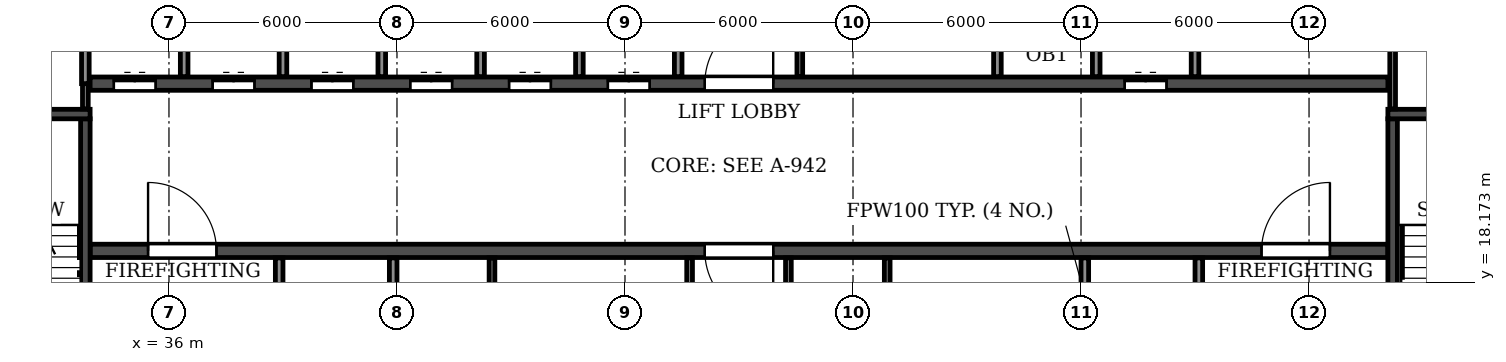
"""IFC4 building model, lengths in metres.
Left out: names, types, materials, properties, quantities, classifications, styles, units other than length and angle.
Written with IfcOpenShell. Run it as: python <this file> out.ifc"""

import sys

from ifc_helpers import new_model, si_unit, direction, frame, frame_2d, origin, place, context, subcontext, project, spatial, rectangle, extrude, element, fill, save


model = new_model("IFC4")
c1 = context("Model", 3, precision=1e-05, world=origin(), true_north=direction((0.0, 1.0)))
c2 = subcontext(c1, "Body", "Model", "MODEL_VIEW")
j1 = project(units=[si_unit("LENGTHUNIT", "METRE"), si_unit("PLANEANGLEUNIT", "RADIAN")], contexts=[c1])
p1 = place(None, origin())
s1 = spatial("IfcSite", under=j1, at=p1, CompositionType="ELEMENT")
p2 = place(p1, origin())
s2 = spatial("IfcBuilding", under=s1, at=p2, CompositionType="ELEMENT")
p3 = place(p2, frame((0.0, 0.0, 251.1)))
s3 = spatial("IfcBuildingStorey", under=s2, at=p3, CompositionType="ELEMENT", Elevation=251.1)
p4 = place(p3, frame((33.925, 19.0, 0.0), z_axis=(0.0, 0.0, 1.0), x_axis=(1.0, 0.0, 0.0)))
e1 = element("IfcWall", 1, at=p4, inside=s3, PredefinedType="SOLIDWALL", context=c2, shape_type="SweptSolid", body=[
    extrude(rectangle(XDim=34.15, YDim=0.35, at=frame_2d((17.075, 0.0))), origin(), (0.0, 0.0, 1.0), 3.08),
])
p5 = place(p4, frame((16.175, 0.0, 0.0)))
e2 = element("IfcOpeningElement", 2, at=p5, cuts=e1, PredefinedType="OPENING", context=c2, shape_type="SweptSolid", body=[
    extrude(rectangle(XDim=1.8, YDim=2.1, at=frame_2d((0.9, 1.05))), frame((0.0, 0.185, 0.0), z_axis=(0.0, -1.0, 0.0), x_axis=(1.0, 0.0, 0.0)), (0.0, 0.0, 1.0), 0.37),
])
p6 = place(p4, frame((1.525, 0.0, 0.0)))
e3 = element("IfcOpeningElement", 3, at=p6, cuts=e1, PredefinedType="OPENING", context=c2, shape_type="SweptSolid", body=[
    extrude(rectangle(XDim=1.8, YDim=2.1, at=frame_2d((0.9, 1.05))), frame((0.0, 0.185, 0.0), z_axis=(0.0, -1.0, 0.0), x_axis=(1.0, 0.0, 0.0)), (0.0, 0.0, 1.0), 0.37),
])
p7 = place(p4, frame((30.825, 0.0, 0.0)))
e4 = element("IfcOpeningElement", 4, at=p7, cuts=e1, PredefinedType="OPENING", context=c2, shape_type="SweptSolid", body=[
    extrude(rectangle(XDim=1.8, YDim=2.1, at=frame_2d((0.9, 1.05))), frame((0.0, 0.185, 0.0), z_axis=(0.0, -1.0, 0.0), x_axis=(1.0, 0.0, 0.0)), (0.0, 0.0, 1.0), 0.37),
])
p8 = place(p3, frame((33.925, 23.4, 0.0), z_axis=(0.0, 0.0, 1.0), x_axis=(1.0, 0.0, 0.0)))
e5 = element("IfcWall", 5, at=p8, inside=s3, PredefinedType="SOLIDWALL", context=c2, shape_type="SweptSolid", body=[
    extrude(rectangle(XDim=34.15, YDim=0.35, at=frame_2d((17.075, 0.0))), origin(), (0.0, 0.0, 1.0), 3.08),
])
p9 = place(p8, frame((16.175, 0.0, 0.0)))
e6 = element("IfcOpeningElement", 6, at=p9, cuts=e5, PredefinedType="OPENING", context=c2, shape_type="SweptSolid", body=[
    extrude(rectangle(XDim=1.8, YDim=2.1, at=frame_2d((0.9, 1.05))), frame((0.0, 0.185, 0.0), z_axis=(0.0, -1.0, 0.0), x_axis=(1.0, 0.0, 0.0)), (0.0, 0.0, 1.0), 0.37),
])
p10 = place(p8, frame((0.625, 0.0, 0.0)))
e7 = element("IfcOpeningElement", 7, at=p10, cuts=e5, PredefinedType="OPENING", context=c2, shape_type="SweptSolid", body=[
    extrude(rectangle(XDim=1.1, YDim=2.1, at=frame_2d((0.55, 1.05))), frame((0.0, 0.185, 0.0), z_axis=(0.0, -1.0, 0.0), x_axis=(1.0, 0.0, 0.0)), (0.0, 0.0, 1.0), 0.37),
])
p11 = place(p8, frame((3.225, 0.0, 0.0)))
e8 = element("IfcOpeningElement", 8, at=p11, cuts=e5, PredefinedType="OPENING", context=c2, shape_type="SweptSolid", body=[
    extrude(rectangle(XDim=1.1, YDim=2.1, at=frame_2d((0.55, 1.05))), frame((0.0, 0.185, 0.0), z_axis=(0.0, -1.0, 0.0), x_axis=(1.0, 0.0, 0.0)), (0.0, 0.0, 1.0), 0.37),
])
p12 = place(p8, frame((5.825, 0.0, 0.0)))
e9 = element("IfcOpeningElement", 9, at=p12, cuts=e5, PredefinedType="OPENING", context=c2, shape_type="SweptSolid", body=[
    extrude(rectangle(XDim=1.1, YDim=2.1, at=frame_2d((0.55, 1.05))), frame((0.0, 0.185, 0.0), z_axis=(0.0, -1.0, 0.0), x_axis=(1.0, 0.0, 0.0)), (0.0, 0.0, 1.0), 0.37),
])
p13 = place(p8, frame((8.425, 0.0, 0.0)))
e10 = element("IfcOpeningElement", 10, at=p13, cuts=e5, PredefinedType="OPENING", context=c2, shape_type="SweptSolid", body=[
    extrude(rectangle(XDim=1.1, YDim=2.1, at=frame_2d((0.55, 1.05))), frame((0.0, 0.185, 0.0), z_axis=(0.0, -1.0, 0.0), x_axis=(1.0, 0.0, 0.0)), (0.0, 0.0, 1.0), 0.37),
])
p14 = place(p8, frame((11.025, 0.0, 0.0)))
e11 = element("IfcOpeningElement", 11, at=p14, cuts=e5, PredefinedType="OPENING", context=c2, shape_type="SweptSolid", body=[
    extrude(rectangle(XDim=1.1, YDim=2.1, at=frame_2d((0.55, 1.05))), frame((0.0, 0.185, 0.0), z_axis=(0.0, -1.0, 0.0), x_axis=(1.0, 0.0, 0.0)), (0.0, 0.0, 1.0), 0.37),
])
p15 = place(p8, frame((13.625, 0.0, 0.0)))
e12 = element("IfcOpeningElement", 12, at=p15, cuts=e5, PredefinedType="OPENING", context=c2, shape_type="SweptSolid", body=[
    extrude(rectangle(XDim=1.1, YDim=2.1, at=frame_2d((0.55, 1.05))), frame((0.0, 0.185, 0.0), z_axis=(0.0, -1.0, 0.0), x_axis=(1.0, 0.0, 0.0)), (0.0, 0.0, 1.0), 0.37),
])
p16 = place(p8, frame((27.225, 0.0, 0.0)))
e13 = element("IfcOpeningElement", 13, at=p16, cuts=e5, PredefinedType="OPENING", context=c2, shape_type="SweptSolid", body=[
    extrude(rectangle(XDim=1.1, YDim=2.1, at=frame_2d((0.55, 1.05))), frame((0.0, 0.185, 0.0), z_axis=(0.0, -1.0, 0.0), x_axis=(1.0, 0.0, 0.0)), (0.0, 0.0, 1.0), 0.37),
])
p17 = place(p3, frame((33.8, 14.775, 0.0), z_axis=(0.0, 0.0, 1.0), x_axis=(0.0, 1.0, 0.0)))
e14 = element("IfcWall", 14, at=p17, inside=s3, PredefinedType="SOLIDWALL", context=c2, shape_type="SweptSolid", body=[
    extrude(rectangle(XDim=7.7, YDim=0.25, at=frame_2d((3.85, 0.0))), origin(), (0.0, 0.0, 1.0), 3.08),
])
p18 = place(p17, frame((0.525, 0.0, 0.0)))
e15 = element("IfcOpeningElement", 15, at=p18, cuts=e14, PredefinedType="OPENING", context=c2, shape_type="SweptSolid", body=[
    extrude(rectangle(XDim=1.0, YDim=2.1, at=frame_2d((0.5, 1.05))), frame((0.0, 0.135, 0.0), z_axis=(0.0, -1.0, 0.0), x_axis=(1.0, 0.0, 0.0)), (0.0, 0.0, 1.0), 0.27),
])
p19 = place(p3, frame((29.875, 22.6, 0.0), z_axis=(0.0, 0.0, 1.0), x_axis=(1.0, 0.0, 0.0)))
e16 = element("IfcWall", 16, at=p19, inside=s3, PredefinedType="SOLIDWALL", context=c2, shape_type="SweptSolid", body=[
    extrude(rectangle(XDim=4.05, YDim=0.25, at=frame_2d((2.025, 0.0))), origin(), (0.0, 0.0, 1.0), 3.08),
])
p20 = place(p3, frame((68.2, 14.775, 0.0), z_axis=(0.0, 0.0, 1.0), x_axis=(0.0, 1.0, 0.0)))
e17 = element("IfcWall", 17, at=p20, inside=s3, PredefinedType="SOLIDWALL", context=c2, shape_type="SweptSolid", body=[
    extrude(rectangle(XDim=7.7, YDim=0.25, at=frame_2d((3.85, 0.0))), origin(), (0.0, 0.0, 1.0), 3.08),
])
p21 = place(p20, frame((0.525, 0.0, 0.0)))
e18 = element("IfcOpeningElement", 18, at=p21, cuts=e17, PredefinedType="OPENING", context=c2, shape_type="SweptSolid", body=[
    extrude(rectangle(XDim=1.0, YDim=2.1, at=frame_2d((0.5, 1.05))), frame((0.0, 0.135, 0.0), z_axis=(0.0, -1.0, 0.0), x_axis=(1.0, 0.0, 0.0)), (0.0, 0.0, 1.0), 0.27),
])
p22 = place(p3, frame((68.075, 22.6, 0.0), z_axis=(0.0, 0.0, 1.0), x_axis=(1.0, 0.0, 0.0)))
e19 = element("IfcWall", 19, at=p22, inside=s3, PredefinedType="SOLIDWALL", context=c2, shape_type="SweptSolid", body=[
    extrude(rectangle(XDim=4.05, YDim=0.25, at=frame_2d((2.025, 0.0))), origin(), (0.0, 0.0, 1.0), 3.08),
])
for number, where, z_axis, x_axis in (
    (20, (49.7, 14.785, 0.0), (0.0, 0.0, 1.0), (0.0, 1.0, 0.0)),
    (21, (52.3, 14.785, 0.0), (0.0, 0.0, 1.0), (0.0, 1.0, 0.0)),
    (22, (52.6, 23.585, 0.0), (0.0, 0.0, 1.0), (0.0, 1.0, 0.0)),
    (23, (44.5, 14.785, 0.0), (0.0, 0.0, 1.0), (0.0, 1.0, 0.0)),
    (24, (54.9, 14.785, 0.0), (0.0, 0.0, 1.0), (0.0, 1.0, 0.0)),
):
    element("IfcWall", number, at=place(p3, frame(where, z_axis=z_axis, x_axis=x_axis)), inside=s3, PredefinedType="PARTITIONING", context=c2, shape_type="SweptSolid", body=[
        extrude(rectangle(XDim=4.03, YDim=0.15, at=frame_2d((2.015, 0.0))), origin(), (0.0, 0.0, 1.0), 3.08),
    ])
p23 = place(p3, frame((33.8, 22.735, 0.0), z_axis=(0.0, 0.0, 1.0), x_axis=(0.0, 1.0, 0.0)))
e25 = element("IfcWall", 25, at=p23, inside=s3, PredefinedType="PARTITIONING", context=c2, shape_type="SweptSolid", body=[
    extrude(rectangle(XDim=0.665, YDim=0.15, at=frame_2d((0.333, 0.0))), origin(), (0.0, 0.0, 1.0), 3.08),
])
p24 = place(p3, frame((68.2, 22.735, 0.0), z_axis=(0.0, 0.0, 1.0), x_axis=(0.0, 1.0, 0.0)))
e26 = element("IfcWall", 26, at=p24, inside=s3, PredefinedType="PARTITIONING", context=c2, shape_type="SweptSolid", body=[
    extrude(rectangle(XDim=4.88, YDim=0.15, at=frame_2d((2.44, 0.0))), origin(), (0.0, 0.0, 1.0), 3.08),
])
p25 = place(p3, frame((33.8, 23.4, 0.0), z_axis=(0.0, 0.0, 1.0), x_axis=(0.0, 1.0, 0.0)))
e27 = element("IfcWall", 27, at=p25, inside=s3, PredefinedType="PARTITIONING", context=c2, shape_type="SweptSolid", body=[
    extrude(rectangle(XDim=2.7, YDim=0.2, at=frame_2d((1.35, 0.0))), origin(), (0.0, 0.0, 1.0), 3.08),
])
p26 = place(p3, frame((36.4, 23.585, 0.0), z_axis=(0.0, 0.0, 1.0), x_axis=(0.0, 1.0, 0.0)))
e28 = element("IfcWall", 28, at=p26, inside=s3, PredefinedType="PARTITIONING", context=c2, shape_type="SweptSolid", body=[
    extrude(rectangle(XDim=2.515, YDim=0.2, at=frame_2d((1.258, 0.0))), origin(), (0.0, 0.0, 1.0), 3.08),
])
p27 = place(p3, frame((38.9, 14.785, 0.0), z_axis=(0.0, 0.0, 1.0), x_axis=(0.0, 1.0, 0.0)))
e29 = element("IfcWall", 29, at=p27, inside=s3, PredefinedType="PARTITIONING", context=c2, shape_type="SweptSolid", body=[
    extrude(rectangle(XDim=4.03, YDim=0.2, at=frame_2d((2.015, 0.0))), origin(), (0.0, 0.0, 1.0), 3.08),
])
p28 = place(p27, frame((1.465, 0.0, 0.0)))
e30 = element("IfcOpeningElement", 30, at=p28, cuts=e29, PredefinedType="OPENING", context=c2, shape_type="SweptSolid", body=[
    extrude(rectangle(XDim=1.1, YDim=2.1, at=frame_2d((0.55, 1.05))), frame((0.0, 0.11, 0.0), z_axis=(0.0, -1.0, 0.0), x_axis=(1.0, 0.0, 0.0)), (0.0, 0.0, 1.0), 0.22),
])
for number, where, z_axis, x_axis in (
    (31, (39.0, 23.585, 0.0), (0.0, 0.0, 1.0), (0.0, 1.0, 0.0)),
    (32, (41.6, 23.585, 0.0), (0.0, 0.0, 1.0), (0.0, 1.0, 0.0)),
):
    element("IfcWall", number, at=place(p3, frame(where, z_axis=z_axis, x_axis=x_axis)), inside=s3, PredefinedType="PARTITIONING", context=c2, shape_type="SweptSolid", body=[
        extrude(rectangle(XDim=2.515, YDim=0.2, at=frame_2d((1.258, 0.0))), origin(), (0.0, 0.0, 1.0), 3.08),
    ])
for number, where, z_axis, x_axis in (
    (33, (41.9, 14.785, 0.0), (0.0, 0.0, 1.0), (0.0, 1.0, 0.0)),
    (34, (44.2, 23.585, 0.0), (0.0, 0.0, 1.0), (0.0, 1.0, 0.0)),
    (35, (46.8, 23.585, 0.0), (0.0, 0.0, 1.0), (0.0, 1.0, 0.0)),
):
    element("IfcWall", number, at=place(p3, frame(where, z_axis=z_axis, x_axis=x_axis)), inside=s3, PredefinedType="PARTITIONING", context=c2, shape_type="SweptSolid", body=[
        extrude(rectangle(XDim=4.03, YDim=0.2, at=frame_2d((2.015, 0.0))), origin(), (0.0, 0.0, 1.0), 3.08),
    ])
for number, where, z_axis, x_axis in (
    (36, (49.4, 23.585, 0.0), (0.0, 0.0, 1.0), (0.0, 1.0, 0.0)),
    (37, (57.8, 23.585, 0.0), (0.0, 0.0, 1.0), (0.0, 1.0, 0.0)),
):
    element("IfcWall", number, at=place(p3, frame(where, z_axis=z_axis, x_axis=x_axis)), inside=s3, PredefinedType="PARTITIONING", context=c2, shape_type="SweptSolid", body=[
        extrude(rectangle(XDim=2.515, YDim=0.2, at=frame_2d((1.258, 0.0))), origin(), (0.0, 0.0, 1.0), 3.08),
    ])
p29 = place(p3, frame((60.1, 14.785, 0.0), z_axis=(0.0, 0.0, 1.0), x_axis=(0.0, 1.0, 0.0)))
e38 = element("IfcWall", 38, at=p29, inside=s3, PredefinedType="PARTITIONING", context=c2, shape_type="SweptSolid", body=[
    extrude(rectangle(XDim=4.03, YDim=0.2, at=frame_2d((2.015, 0.0))), origin(), (0.0, 0.0, 1.0), 3.08),
])
for number, where, z_axis, x_axis in (
    (39, (60.4, 23.585, 0.0), (0.0, 0.0, 1.0), (0.0, 1.0, 0.0)),
    (40, (63.0, 23.585, 0.0), (0.0, 0.0, 1.0), (0.0, 1.0, 0.0)),
):
    element("IfcWall", number, at=place(p3, frame(where, z_axis=z_axis, x_axis=x_axis)), inside=s3, PredefinedType="PARTITIONING", context=c2, shape_type="SweptSolid", body=[
        extrude(rectangle(XDim=2.515, YDim=0.2, at=frame_2d((1.258, 0.0))), origin(), (0.0, 0.0, 1.0), 3.08),
    ])
p30 = place(p3, frame((63.1, 14.785, 0.0), z_axis=(0.0, 0.0, 1.0), x_axis=(0.0, 1.0, 0.0)))
e41 = element("IfcWall", 41, at=p30, inside=s3, PredefinedType="PARTITIONING", context=c2, shape_type="SweptSolid", body=[
    extrude(rectangle(XDim=4.03, YDim=0.2, at=frame_2d((2.015, 0.0))), origin(), (0.0, 0.0, 1.0), 3.08),
])
p31 = place(p30, frame((1.465, 0.0, 0.0)))
e42 = element("IfcOpeningElement", 42, at=p31, cuts=e41, PredefinedType="OPENING", context=c2, shape_type="SweptSolid", body=[
    extrude(rectangle(XDim=1.1, YDim=2.1, at=frame_2d((0.55, 1.05))), frame((0.0, 0.11, 0.0), z_axis=(0.0, -1.0, 0.0), x_axis=(1.0, 0.0, 0.0)), (0.0, 0.0, 1.0), 0.22),
])
p32 = place(p9, origin())
e43 = element("IfcDoor", 43, at=p32, inside=s3, OperationType="DOUBLE_DOOR_SINGLE_SWING", PredefinedType="DOOR", context=c2, shape_type="SweptSolid", body=[
    extrude(rectangle(XDim=1.8, YDim=2.1, at=frame_2d((0.9, 1.05))), frame((0.0, 0.025, 0.0), z_axis=(0.0, -1.0, 0.0), x_axis=(1.0, 0.0, 0.0)), (0.0, 0.0, 1.0), 0.05),
])
fill(e6, e43)
p33 = place(p5, frame((1.8, 0.0, 0.0), z_axis=(0.0, 0.0, 1.0), x_axis=(-1.0, 0.0, 0.0)))
e44 = element("IfcDoor", 44, at=p33, inside=s3, OperationType="DOUBLE_DOOR_SINGLE_SWING", PredefinedType="DOOR", context=c2, shape_type="SweptSolid", body=[
    extrude(rectangle(XDim=1.8, YDim=2.1, at=frame_2d((0.9, 1.05))), frame((0.0, 0.025, 0.0), z_axis=(0.0, -1.0, 0.0), x_axis=(1.0, 0.0, 0.0)), (0.0, 0.0, 1.0), 0.05),
])
fill(e2, e44)
p34 = place(p10, origin())
e45 = element("IfcDoor", 45, at=p34, inside=s3, OperationType="DOUBLE_DOOR_SLIDING", PredefinedType="DOOR", context=c2, shape_type="SweptSolid", body=[
    extrude(rectangle(XDim=1.1, YDim=2.1, at=frame_2d((0.55, 1.05))), frame((0.0, 0.025, 0.0), z_axis=(0.0, -1.0, 0.0), x_axis=(1.0, 0.0, 0.0)), (0.0, 0.0, 1.0), 0.05),
])
fill(e7, e45)
p35 = place(p6, origin())
e46 = element("IfcDoor", 46, at=p35, inside=s3, OperationType="DOUBLE_DOOR_SINGLE_SWING", PredefinedType="DOOR", context=c2, shape_type="SweptSolid", body=[
    extrude(rectangle(XDim=1.8, YDim=2.1, at=frame_2d((0.9, 1.05))), frame((0.0, 0.025, 0.0), z_axis=(0.0, -1.0, 0.0), x_axis=(1.0, 0.0, 0.0)), (0.0, 0.0, 1.0), 0.05),
])
fill(e3, e46)
p36 = place(p11, origin())
e47 = element("IfcDoor", 47, at=p36, inside=s3, OperationType="DOUBLE_DOOR_SLIDING", PredefinedType="DOOR", context=c2, shape_type="SweptSolid", body=[
    extrude(rectangle(XDim=1.1, YDim=2.1, at=frame_2d((0.55, 1.05))), frame((0.0, 0.025, 0.0), z_axis=(0.0, -1.0, 0.0), x_axis=(1.0, 0.0, 0.0)), (0.0, 0.0, 1.0), 0.05),
])
fill(e8, e47)
p37 = place(p12, origin())
e48 = element("IfcDoor", 48, at=p37, inside=s3, OperationType="DOUBLE_DOOR_SLIDING", PredefinedType="DOOR", context=c2, shape_type="SweptSolid", body=[
    extrude(rectangle(XDim=1.1, YDim=2.1, at=frame_2d((0.55, 1.05))), frame((0.0, 0.025, 0.0), z_axis=(0.0, -1.0, 0.0), x_axis=(1.0, 0.0, 0.0)), (0.0, 0.0, 1.0), 0.05),
])
fill(e9, e48)
p38 = place(p13, origin())
e49 = element("IfcDoor", 49, at=p38, inside=s3, OperationType="DOUBLE_DOOR_SLIDING", PredefinedType="DOOR", context=c2, shape_type="SweptSolid", body=[
    extrude(rectangle(XDim=1.1, YDim=2.1, at=frame_2d((0.55, 1.05))), frame((0.0, 0.025, 0.0), z_axis=(0.0, -1.0, 0.0), x_axis=(1.0, 0.0, 0.0)), (0.0, 0.0, 1.0), 0.05),
])
fill(e10, e49)
p39 = place(p14, origin())
e50 = element("IfcDoor", 50, at=p39, inside=s3, OperationType="DOUBLE_DOOR_SLIDING", PredefinedType="DOOR", context=c2, shape_type="SweptSolid", body=[
    extrude(rectangle(XDim=1.1, YDim=2.1, at=frame_2d((0.55, 1.05))), frame((0.0, 0.025, 0.0), z_axis=(0.0, -1.0, 0.0), x_axis=(1.0, 0.0, 0.0)), (0.0, 0.0, 1.0), 0.05),
])
fill(e11, e50)
p40 = place(p15, origin())
e51 = element("IfcDoor", 51, at=p40, inside=s3, OperationType="DOUBLE_DOOR_SLIDING", PredefinedType="DOOR", context=c2, shape_type="SweptSolid", body=[
    extrude(rectangle(XDim=1.1, YDim=2.1, at=frame_2d((0.55, 1.05))), frame((0.0, 0.025, 0.0), z_axis=(0.0, -1.0, 0.0), x_axis=(1.0, 0.0, 0.0)), (0.0, 0.0, 1.0), 0.05),
])
fill(e12, e51)
p41 = place(p16, origin())
e52 = element("IfcDoor", 52, at=p41, inside=s3, OperationType="DOUBLE_DOOR_SLIDING", PredefinedType="DOOR", context=c2, shape_type="SweptSolid", body=[
    extrude(rectangle(XDim=1.1, YDim=2.1, at=frame_2d((0.55, 1.05))), frame((0.0, 0.025, 0.0), z_axis=(0.0, -1.0, 0.0), x_axis=(1.0, 0.0, 0.0)), (0.0, 0.0, 1.0), 0.05),
])
fill(e13, e52)
p42 = place(p7, origin())
e53 = element("IfcDoor", 53, at=p42, inside=s3, OperationType="DOUBLE_DOOR_SINGLE_SWING", PredefinedType="DOOR", context=c2, shape_type="SweptSolid", body=[
    extrude(rectangle(XDim=1.8, YDim=2.1, at=frame_2d((0.9, 1.05))), frame((0.0, 0.025, 0.0), z_axis=(0.0, -1.0, 0.0), x_axis=(1.0, 0.0, 0.0)), (0.0, 0.0, 1.0), 0.05),
])
fill(e4, e53)
save(model, sys.argv[1])
